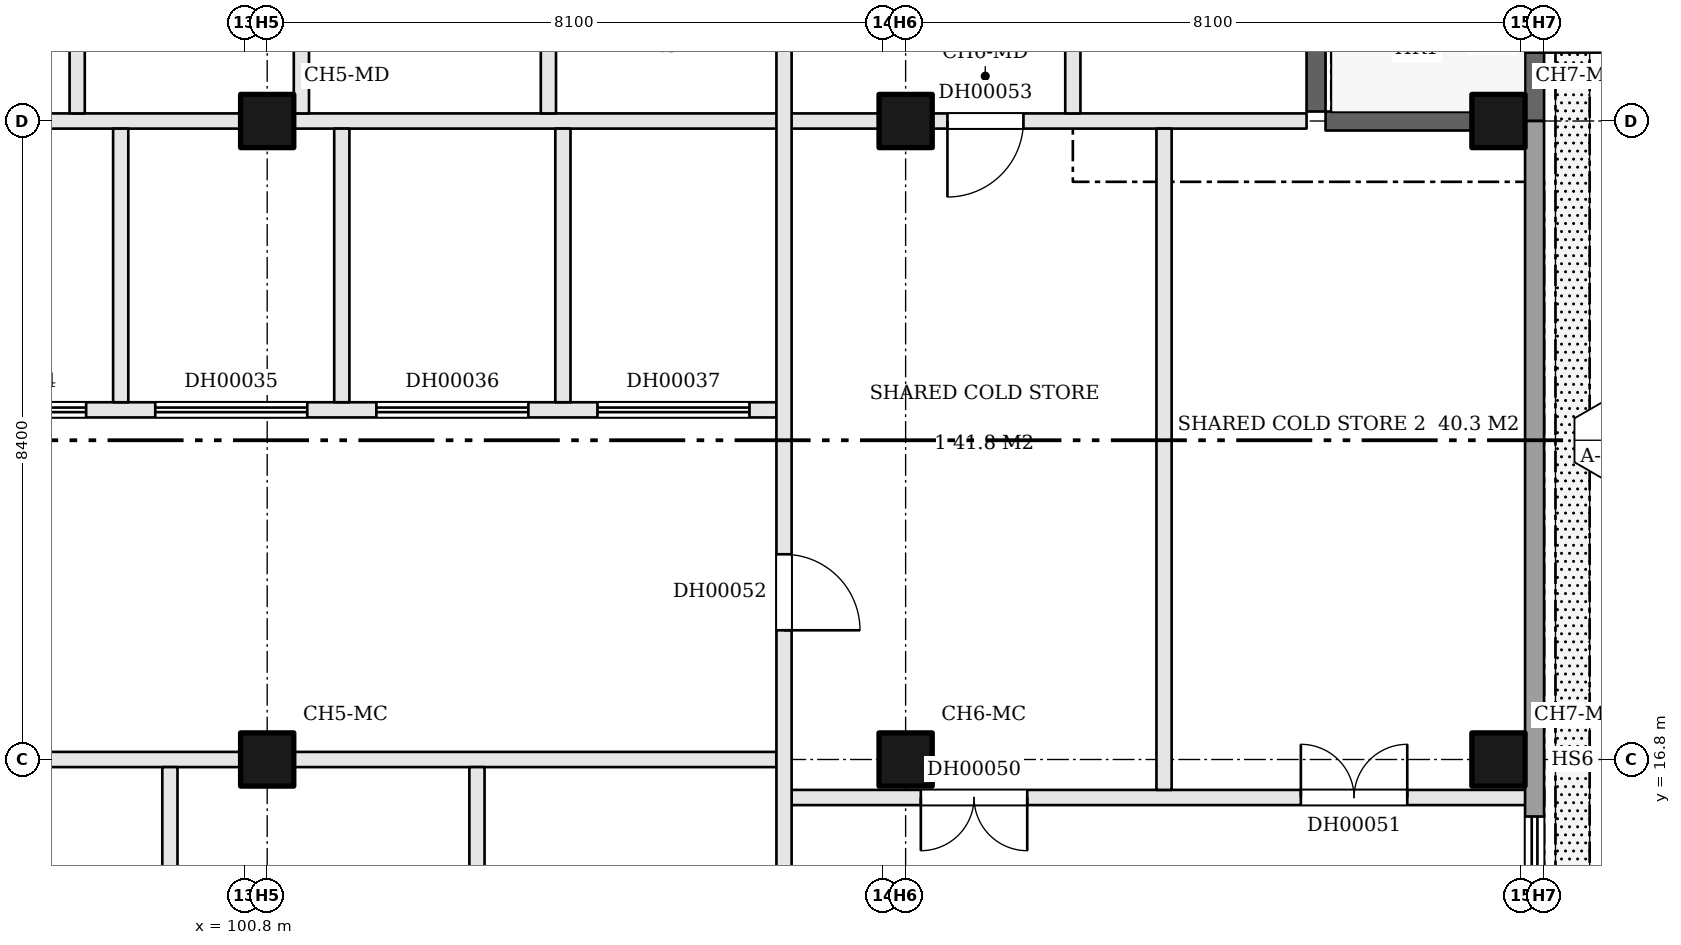
"""IFC4 building model, lengths in metres.
Left out: names, types, materials, properties, quantities, classifications, styles, units other than length and angle.
Written with IfcOpenShell. Run it as: python <this file> out.ifc"""

import sys

from ifc_helpers import new_model, si_unit, direction, frame, frame_2d, origin, origin_2d, place, context, subcontext, project, spatial, rectangle, extrude, element, fill, save


model = new_model("IFC4")
c1 = context("Model", 3, precision=1e-05, world=origin(), true_north=direction((0.0, 1.0)))
c2 = subcontext(c1, "Body", "Model", "MODEL_VIEW")
j1 = project(units=[si_unit("LENGTHUNIT", "METRE"), si_unit("PLANEANGLEUNIT", "RADIAN")], contexts=[c1])
p1 = place(None, origin())
s1 = spatial("IfcSite", under=j1, at=p1, CompositionType="ELEMENT")
p2 = place(p1, origin())
s2 = spatial("IfcBuilding", under=s1, at=p2, CompositionType="ELEMENT")
p3 = place(p2, origin())
s3 = spatial("IfcBuildingStorey", under=s2, at=p3, CompositionType="ELEMENT", Elevation=0.0)
for number, where, z_axis, x_axis in (
    (1, (101.1, 16.8, -0.2), (0.0, 0.0, 1.0), (1.0, 0.0, 0.0)),
    (2, (101.1, 25.2, -0.2), (0.0, 0.0, 1.0), (1.0, 0.0, 0.0)),
    (3, (109.5, 16.8, -0.2), (0.0, 0.0, 1.0), (1.0, 0.0, 0.0)),
    (4, (109.5, 25.2, -0.2), (0.0, 0.0, 1.0), (1.0, 0.0, 0.0)),
    (5, (117.3, 16.8, -0.2), (0.0, 0.0, 1.0), (1.0, 0.0, 0.0)),
):
    element("IfcColumn", number, at=place(p3, frame(where, z_axis=z_axis, x_axis=x_axis)), inside=s3, PredefinedType="COLUMN", context=c2, shape_type="SweptSolid", body=[
        extrude(rectangle(XDim=0.7, YDim=0.7, at=origin_2d()), origin(), (0.0, 0.0, 1.0), 8.9),
    ])
p4 = place(p3, frame((117.3, 25.2, 0.0), z_axis=(0.0, 0.0, 1.0), x_axis=(1.0, 0.0, 0.0)))
e6 = element("IfcColumn", 6, at=p4, inside=s3, PredefinedType="COLUMN", context=c2, shape_type="SweptSolid", body=[
    extrude(rectangle(XDim=0.7, YDim=0.7, at=origin_2d()), origin(), (0.0, 0.0, 1.0), 8.7),
])
p5 = place(p3, frame((108.0, 16.3, 0.0), z_axis=(0.0, 0.0, 1.0), x_axis=(1.0, 0.0, 0.0)))
e7 = element("IfcWall", 7, at=p5, inside=s3, PredefinedType="PARTITIONING", context=c2, shape_type="SweptSolid", body=[
    extrude(rectangle(XDim=9.9, YDim=0.2, at=frame_2d((4.95, 0.0))), origin(), (0.0, 0.0, 1.0), 8.7),
])
p6 = place(p5, frame((1.7, 0.0, 0.0)))
e8 = element("IfcOpeningElement", 8, at=p6, cuts=e7, PredefinedType="OPENING", context=c2, shape_type="SweptSolid", body=[
    extrude(rectangle(XDim=1.4, YDim=2.1, at=frame_2d((0.7, 1.05))), frame((0.0, 0.11, 0.0), z_axis=(0.0, -1.0, 0.0), x_axis=(1.0, 0.0, 0.0)), (0.0, 0.0, 1.0), 0.22),
])
p7 = place(p5, frame((6.7, 0.0, 0.0)))
e9 = element("IfcOpeningElement", 9, at=p7, cuts=e7, PredefinedType="OPENING", context=c2, shape_type="SweptSolid", body=[
    extrude(rectangle(XDim=1.4, YDim=2.1, at=frame_2d((0.7, 1.05))), frame((0.0, 0.11, 0.0), z_axis=(0.0, -1.0, 0.0), x_axis=(1.0, 0.0, 0.0)), (0.0, 0.0, 1.0), 0.22),
])
p8 = place(p3, frame((93.05, 16.8, 0.0), z_axis=(0.0, 0.0, 1.0), x_axis=(1.0, 0.0, 0.0)))
e10 = element("IfcWall", 10, at=p8, inside=s3, PredefinedType="PARTITIONING", context=c2, shape_type="SweptSolid", body=[
    extrude(rectangle(XDim=7.7, YDim=0.2, at=frame_2d((3.85, 0.0))), origin(), (0.0, 0.0, 1.0), 8.7),
])
p9 = place(p3, frame((101.45, 16.8, 0.0), z_axis=(0.0, 0.0, 1.0), x_axis=(1.0, 0.0, 0.0)))
e11 = element("IfcWall", 11, at=p9, inside=s3, PredefinedType="PARTITIONING", context=c2, shape_type="SweptSolid", body=[
    extrude(rectangle(XDim=6.35, YDim=0.2, at=frame_2d((3.175, 0.0))), origin(), (0.0, 0.0, 1.0), 8.7),
])
p10 = place(p3, frame((76.0, 21.4, 0.0), z_axis=(0.0, 0.0, 1.0), x_axis=(1.0, 0.0, 0.0)))
e12 = element("IfcWall", 12, at=p10, inside=s3, PredefinedType="PARTITIONING", context=c2, shape_type="SweptSolid", body=[
    extrude(rectangle(XDim=31.8, YDim=0.2, at=frame_2d((15.9, 0.0))), origin(), (0.0, 0.0, 1.0), 8.7),
])
p11 = place(p10, frame((0.354, 0.0, 0.0)))
e13 = element("IfcOpeningElement", 13, at=p11, cuts=e12, PredefinedType="OPENING", context=c2, shape_type="SweptSolid", body=[
    extrude(rectangle(XDim=2.0, YDim=2.4, at=frame_2d((1.0, 1.2))), frame((0.0, 0.11, 0.0), z_axis=(0.0, -1.0, 0.0), x_axis=(1.0, 0.0, 0.0)), (0.0, 0.0, 1.0), 0.22),
])
p12 = place(p10, frame((3.264, 0.0, 0.0)))
e14 = element("IfcOpeningElement", 14, at=p12, cuts=e12, PredefinedType="OPENING", context=c2, shape_type="SweptSolid", body=[
    extrude(rectangle(XDim=2.0, YDim=2.4, at=frame_2d((1.0, 1.2))), frame((0.0, 0.11, 0.0), z_axis=(0.0, -1.0, 0.0), x_axis=(1.0, 0.0, 0.0)), (0.0, 0.0, 1.0), 0.22),
])
p13 = place(p10, frame((6.173, 0.0, 0.0)))
e15 = element("IfcOpeningElement", 15, at=p13, cuts=e12, PredefinedType="OPENING", context=c2, shape_type="SweptSolid", body=[
    extrude(rectangle(XDim=2.0, YDim=2.4, at=frame_2d((1.0, 1.2))), frame((0.0, 0.11, 0.0), z_axis=(0.0, -1.0, 0.0), x_axis=(1.0, 0.0, 0.0)), (0.0, 0.0, 1.0), 0.22),
])
p14 = place(p10, frame((9.082, 0.0, 0.0)))
e16 = element("IfcOpeningElement", 16, at=p14, cuts=e12, PredefinedType="OPENING", context=c2, shape_type="SweptSolid", body=[
    extrude(rectangle(XDim=2.0, YDim=2.4, at=frame_2d((1.0, 1.2))), frame((0.0, 0.11, 0.0), z_axis=(0.0, -1.0, 0.0), x_axis=(1.0, 0.0, 0.0)), (0.0, 0.0, 1.0), 0.22),
])
p15 = place(p10, frame((11.991, 0.0, 0.0)))
e17 = element("IfcOpeningElement", 17, at=p15, cuts=e12, PredefinedType="OPENING", context=c2, shape_type="SweptSolid", body=[
    extrude(rectangle(XDim=2.0, YDim=2.4, at=frame_2d((1.0, 1.2))), frame((0.0, 0.11, 0.0), z_axis=(0.0, -1.0, 0.0), x_axis=(1.0, 0.0, 0.0)), (0.0, 0.0, 1.0), 0.22),
])
p16 = place(p10, frame((14.9, 0.0, 0.0)))
e18 = element("IfcOpeningElement", 18, at=p16, cuts=e12, PredefinedType="OPENING", context=c2, shape_type="SweptSolid", body=[
    extrude(rectangle(XDim=2.0, YDim=2.4, at=frame_2d((1.0, 1.2))), frame((0.0, 0.11, 0.0), z_axis=(0.0, -1.0, 0.0), x_axis=(1.0, 0.0, 0.0)), (0.0, 0.0, 1.0), 0.22),
])
p17 = place(p10, frame((17.809, 0.0, 0.0)))
e19 = element("IfcOpeningElement", 19, at=p17, cuts=e12, PredefinedType="OPENING", context=c2, shape_type="SweptSolid", body=[
    extrude(rectangle(XDim=2.0, YDim=2.4, at=frame_2d((1.0, 1.2))), frame((0.0, 0.11, 0.0), z_axis=(0.0, -1.0, 0.0), x_axis=(1.0, 0.0, 0.0)), (0.0, 0.0, 1.0), 0.22),
])
p18 = place(p10, frame((20.718, 0.0, 0.0)))
e20 = element("IfcOpeningElement", 20, at=p18, cuts=e12, PredefinedType="OPENING", context=c2, shape_type="SweptSolid", body=[
    extrude(rectangle(XDim=2.0, YDim=2.4, at=frame_2d((1.0, 1.2))), frame((0.0, 0.11, 0.0), z_axis=(0.0, -1.0, 0.0), x_axis=(1.0, 0.0, 0.0)), (0.0, 0.0, 1.0), 0.22),
])
p19 = place(p10, frame((23.627, 0.0, 0.0)))
e21 = element("IfcOpeningElement", 21, at=p19, cuts=e12, PredefinedType="OPENING", context=c2, shape_type="SweptSolid", body=[
    extrude(rectangle(XDim=2.0, YDim=2.4, at=frame_2d((1.0, 1.2))), frame((0.0, 0.11, 0.0), z_axis=(0.0, -1.0, 0.0), x_axis=(1.0, 0.0, 0.0)), (0.0, 0.0, 1.0), 0.22),
])
p20 = place(p10, frame((26.536, 0.0, 0.0)))
e22 = element("IfcOpeningElement", 22, at=p20, cuts=e12, PredefinedType="OPENING", context=c2, shape_type="SweptSolid", body=[
    extrude(rectangle(XDim=2.0, YDim=2.4, at=frame_2d((1.0, 1.2))), frame((0.0, 0.11, 0.0), z_axis=(0.0, -1.0, 0.0), x_axis=(1.0, 0.0, 0.0)), (0.0, 0.0, 1.0), 0.22),
])
p21 = place(p10, frame((29.446, 0.0, 0.0)))
e23 = element("IfcOpeningElement", 23, at=p21, cuts=e12, PredefinedType="OPENING", context=c2, shape_type="SweptSolid", body=[
    extrude(rectangle(XDim=2.0, YDim=2.4, at=frame_2d((1.0, 1.2))), frame((0.0, 0.11, 0.0), z_axis=(0.0, -1.0, 0.0), x_axis=(1.0, 0.0, 0.0)), (0.0, 0.0, 1.0), 0.22),
])
for number, where, z_axis, x_axis in (
    (24, (93.05, 25.2, 0.0), (0.0, 0.0, 1.0), (1.0, 0.0, 0.0)),
    (25, (101.45, 25.2, 0.0), (0.0, 0.0, 1.0), (1.0, 0.0, 0.0)),
):
    element("IfcWall", number, at=place(p3, frame(where, z_axis=z_axis, x_axis=x_axis)), inside=s3, PredefinedType="PARTITIONING", context=c2, shape_type="SweptSolid", body=[
        extrude(rectangle(XDim=7.7, YDim=0.2, at=frame_2d((3.85, 0.0))), origin(), (0.0, 0.0, 1.0), 8.7),
    ])
p22 = place(p3, frame((109.85, 25.2, 0.0), z_axis=(0.0, 0.0, 1.0), x_axis=(1.0, 0.0, 0.0)))
e26 = element("IfcWall", 26, at=p22, inside=s3, PredefinedType="PARTITIONING", context=c2, shape_type="SweptSolid", body=[
    extrude(rectangle(XDim=4.925, YDim=0.2, at=frame_2d((2.462, 0.0))), origin(), (0.0, 0.0, 1.0), 8.7),
])
p23 = place(p22, frame((0.2, 0.0, 0.0)))
e27 = element("IfcOpeningElement", 27, at=p23, cuts=e26, PredefinedType="OPENING", context=c2, shape_type="SweptSolid", body=[
    extrude(rectangle(XDim=1.0, YDim=2.1, at=frame_2d((0.5, 1.05))), frame((0.0, 0.11, 0.0), z_axis=(0.0, -1.0, 0.0), x_axis=(1.0, 0.0, 0.0)), (0.0, 0.0, 1.0), 0.22),
])
p24 = place(p3, frame((115.025, 25.2, 0.0), z_axis=(0.0, 0.0, 1.0), x_axis=(1.0, 0.0, 0.0)))
e28 = element("IfcWall", 28, at=p24, inside=s3, PredefinedType="SHEAR", context=c2, shape_type="SweptSolid", body=[
    extrude(rectangle(XDim=1.925, YDim=0.25, at=frame_2d((0.962, 0.0))), origin(), (0.0, 0.0, 1.0), 8.7),
])
p25 = place(p3, frame((98.6, 25.3, 0.0), z_axis=(0.0, 0.0, 1.0), x_axis=(0.0, 1.0, 0.0)))
e29 = element("IfcWall", 29, at=p25, inside=s3, PredefinedType="PARTITIONING", context=c2, shape_type="SweptSolid", body=[
    extrude(rectangle(XDim=4.4, YDim=0.2, at=frame_2d((2.2, 0.0))), origin(), (0.0, 0.0, 1.0), 8.7),
])
p26 = place(p3, frame((99.173, 21.5, 0.0), z_axis=(0.0, 0.0, 1.0), x_axis=(0.0, 1.0, 0.0)))
e30 = element("IfcWall", 30, at=p26, inside=s3, PredefinedType="PARTITIONING", context=c2, shape_type="SweptSolid", body=[
    extrude(rectangle(XDim=3.6, YDim=0.2, at=frame_2d((1.8, 0.0))), origin(), (0.0, 0.0, 1.0), 8.7),
])
p27 = place(p3, frame((99.82, 14.4, 0.0), z_axis=(0.0, 0.0, 1.0), x_axis=(0.0, 1.0, 0.0)))
e31 = element("IfcWall", 31, at=p27, inside=s3, PredefinedType="PARTITIONING", context=c2, shape_type="SweptSolid", body=[
    extrude(rectangle(XDim=2.3, YDim=0.2, at=frame_2d((1.15, 0.0))), origin(), (0.0, 0.0, 1.0), 8.7),
])
p28 = place(p3, frame((101.55, 25.3, 0.0), z_axis=(0.0, 0.0, 1.0), x_axis=(0.0, 1.0, 0.0)))
e32 = element("IfcWall", 32, at=p28, inside=s3, PredefinedType="PARTITIONING", context=c2, shape_type="SweptSolid", body=[
    extrude(rectangle(XDim=4.4, YDim=0.2, at=frame_2d((2.2, 0.0))), origin(), (0.0, 0.0, 1.0), 8.7),
])
p29 = place(p3, frame((102.082, 21.5, 0.0), z_axis=(0.0, 0.0, 1.0), x_axis=(0.0, 1.0, 0.0)))
e33 = element("IfcWall", 33, at=p29, inside=s3, PredefinedType="PARTITIONING", context=c2, shape_type="SweptSolid", body=[
    extrude(rectangle(XDim=3.6, YDim=0.2, at=frame_2d((1.8, 0.0))), origin(), (0.0, 0.0, 1.0), 8.7),
])
p30 = place(p3, frame((103.86, 14.4, 0.0), z_axis=(0.0, 0.0, 1.0), x_axis=(0.0, 1.0, 0.0)))
e34 = element("IfcWall", 34, at=p30, inside=s3, PredefinedType="PARTITIONING", context=c2, shape_type="SweptSolid", body=[
    extrude(rectangle(XDim=2.3, YDim=0.2, at=frame_2d((1.15, 0.0))), origin(), (0.0, 0.0, 1.0), 8.7),
])
p31 = place(p3, frame((104.8, 25.3, 0.0), z_axis=(0.0, 0.0, 1.0), x_axis=(0.0, 1.0, 0.0)))
e35 = element("IfcWall", 35, at=p31, inside=s3, PredefinedType="PARTITIONING", context=c2, shape_type="SweptSolid", body=[
    extrude(rectangle(XDim=4.4, YDim=0.2, at=frame_2d((2.2, 0.0))), origin(), (0.0, 0.0, 1.0), 8.7),
])
p32 = place(p3, frame((104.991, 21.5, 0.0), z_axis=(0.0, 0.0, 1.0), x_axis=(0.0, 1.0, 0.0)))
e36 = element("IfcWall", 36, at=p32, inside=s3, PredefinedType="PARTITIONING", context=c2, shape_type="SweptSolid", body=[
    extrude(rectangle(XDim=3.6, YDim=0.2, at=frame_2d((1.8, 0.0))), origin(), (0.0, 0.0, 1.0), 8.7),
])
p33 = place(p3, frame((107.9, 8.5, 0.0), z_axis=(0.0, 0.0, 1.0), x_axis=(0.0, 1.0, 0.0)))
e37 = element("IfcWall", 37, at=p33, inside=s3, PredefinedType="PARTITIONING", context=c2, shape_type="SweptSolid", body=[
    extrude(rectangle(XDim=25.1, YDim=0.2, at=frame_2d((12.55, 0.0))), origin(), (0.0, 0.0, 1.0), 8.7),
])
p34 = place(p33, frame((3.8, 0.0, 0.0)))
e38 = element("IfcOpeningElement", 38, at=p34, cuts=e37, PredefinedType="OPENING", context=c2, shape_type="SweptSolid", body=[
    extrude(rectangle(XDim=1.0, YDim=2.1, at=frame_2d((0.5, 1.05))), frame((0.0, 0.11, 0.0), z_axis=(0.0, -1.0, 0.0), x_axis=(1.0, 0.0, 0.0)), (0.0, 0.0, 1.0), 0.22),
])
p35 = place(p33, frame((10.0, 0.0, 0.0)))
e39 = element("IfcOpeningElement", 39, at=p35, cuts=e37, PredefinedType="OPENING", context=c2, shape_type="SweptSolid", body=[
    extrude(rectangle(XDim=1.0, YDim=2.1, at=frame_2d((0.5, 1.05))), frame((0.0, 0.11, 0.0), z_axis=(0.0, -1.0, 0.0), x_axis=(1.0, 0.0, 0.0)), (0.0, 0.0, 1.0), 0.22),
])
p36 = place(p33, frame((22.5, 0.0, 0.0)))
e40 = element("IfcOpeningElement", 40, at=p36, cuts=e37, PredefinedType="OPENING", context=c2, shape_type="SweptSolid", body=[
    extrude(rectangle(XDim=1.0, YDim=2.1, at=frame_2d((0.5, 1.05))), frame((0.0, 0.11, 0.0), z_axis=(0.0, -1.0, 0.0), x_axis=(1.0, 0.0, 0.0)), (0.0, 0.0, 1.0), 0.22),
])
p37 = place(p3, frame((111.7, 25.3, 0.0), z_axis=(0.0, 0.0, 1.0), x_axis=(0.0, 1.0, 0.0)))
e41 = element("IfcWall", 41, at=p37, inside=s3, PredefinedType="PARTITIONING", context=c2, shape_type="SweptSolid", body=[
    extrude(rectangle(XDim=8.3, YDim=0.2, at=frame_2d((4.15, 0.0))), origin(), (0.0, 0.0, 1.0), 8.7),
])
p38 = place(p37, frame((3.6, 0.0, 0.0)))
e42 = element("IfcOpeningElement", 42, at=p38, cuts=e41, PredefinedType="OPENING", context=c2, shape_type="SweptSolid", body=[
    extrude(rectangle(XDim=1.0, YDim=2.1, at=frame_2d((0.5, 1.05))), frame((0.0, 0.11, 0.0), z_axis=(0.0, -1.0, 0.0), x_axis=(1.0, 0.0, 0.0)), (0.0, 0.0, 1.0), 0.22),
])
p39 = place(p3, frame((112.9, 16.4, 0.0), z_axis=(0.0, 0.0, 1.0), x_axis=(0.0, 1.0, 0.0)))
e43 = element("IfcWall", 43, at=p39, inside=s3, PredefinedType="PARTITIONING", context=c2, shape_type="SweptSolid", body=[
    extrude(rectangle(XDim=8.7, YDim=0.2, at=frame_2d((4.35, 0.0))), origin(), (0.0, 0.0, 1.0), 8.7),
])
p40 = place(p3, frame((114.9, 25.325, 0.0), z_axis=(0.0, 0.0, 1.0), x_axis=(0.0, 1.0, 0.0)))
e44 = element("IfcWall", 44, at=p40, inside=s3, PredefinedType="SHEAR", context=c2, shape_type="SweptSolid", body=[
    extrude(rectangle(XDim=8.275, YDim=0.25, at=frame_2d((4.138, 0.0))), origin(), (0.0, 0.0, 1.0), 8.7),
])
p41 = place(p3, frame((117.775, 8.4, 0.0), z_axis=(0.0, 0.0, 1.0), x_axis=(0.0, 1.0, 0.0)))
e45 = element("IfcWall", 45, at=p41, inside=s3, PredefinedType="SOLIDWALL", context=c2, shape_type="SweptSolid", body=[
    extrude(rectangle(XDim=16.8, YDim=0.25, at=frame_2d((8.4, 0.0))), origin(), (0.0, 0.0, 1.0), 8.7),
])
p42 = place(p41, frame((1.15, 0.0, 0.0)))
e46 = element("IfcOpeningElement", 46, at=p42, cuts=e45, PredefinedType="OPENING", context=c2, shape_type="SweptSolid", body=[
    extrude(rectangle(XDim=3.0, YDim=4.5, at=frame_2d((1.5, 2.25))), frame((0.0, 0.135, 0.0), z_axis=(0.0, -1.0, 0.0), x_axis=(1.0, 0.0, 0.0)), (0.0, 0.0, 1.0), 0.27),
])
p43 = place(p41, frame((4.65, 0.0, 0.0)))
e47 = element("IfcOpeningElement", 47, at=p43, cuts=e45, PredefinedType="OPENING", context=c2, shape_type="SweptSolid", body=[
    extrude(rectangle(XDim=3.0, YDim=4.5, at=frame_2d((1.5, 2.25))), frame((0.0, 0.135, 0.0), z_axis=(0.0, -1.0, 0.0), x_axis=(1.0, 0.0, 0.0)), (0.0, 0.0, 1.0), 0.27),
])
p44 = place(p3, frame((117.775, 25.2, 0.0), z_axis=(0.0, 0.0, 1.0), x_axis=(0.0, 1.0, 0.0)))
e48 = element("IfcWall", 48, at=p44, inside=s3, PredefinedType="SHEAR", context=c2, shape_type="SweptSolid", body=[
    extrude(rectangle(XDim=8.4, YDim=0.25, at=frame_2d((4.2, 0.0))), origin(), (0.0, 0.0, 1.0), 8.7),
])
p45 = place(p44, frame((0.9, 0.0, 0.0)))
e49 = element("IfcOpeningElement", 49, at=p45, cuts=e48, PredefinedType="OPENING", context=c2, shape_type="SweptSolid", body=[
    extrude(rectangle(XDim=1.2, YDim=2.1, at=frame_2d((0.6, 1.05))), frame((0.0, 0.135, 0.0), z_axis=(0.0, -1.0, 0.0), x_axis=(1.0, 0.0, 0.0)), (0.0, 0.0, 1.0), 0.27),
])
p46 = place(p18, origin())
e50 = element("IfcDoor", 50, at=p46, inside=s3, OperationType="ROLLINGUP", PredefinedType="DOOR", context=c2, shape_type="SweptSolid", body=[
    extrude(rectangle(XDim=2.0, YDim=2.4, at=frame_2d((1.0, 1.2))), frame((0.0, 0.025, 0.0), z_axis=(0.0, -1.0, 0.0), x_axis=(1.0, 0.0, 0.0)), (0.0, 0.0, 1.0), 0.05),
])
fill(e20, e50)
p47 = place(p19, origin())
e51 = element("IfcDoor", 51, at=p47, inside=s3, OperationType="ROLLINGUP", PredefinedType="DOOR", context=c2, shape_type="SweptSolid", body=[
    extrude(rectangle(XDim=2.0, YDim=2.4, at=frame_2d((1.0, 1.2))), frame((0.0, 0.025, 0.0), z_axis=(0.0, -1.0, 0.0), x_axis=(1.0, 0.0, 0.0)), (0.0, 0.0, 1.0), 0.05),
])
fill(e21, e51)
p48 = place(p20, origin())
e52 = element("IfcDoor", 52, at=p48, inside=s3, OperationType="ROLLINGUP", PredefinedType="DOOR", context=c2, shape_type="SweptSolid", body=[
    extrude(rectangle(XDim=2.0, YDim=2.4, at=frame_2d((1.0, 1.2))), frame((0.0, 0.025, 0.0), z_axis=(0.0, -1.0, 0.0), x_axis=(1.0, 0.0, 0.0)), (0.0, 0.0, 1.0), 0.05),
])
fill(e22, e52)
p49 = place(p21, origin())
e53 = element("IfcDoor", 53, at=p49, inside=s3, OperationType="ROLLINGUP", PredefinedType="DOOR", context=c2, shape_type="SweptSolid", body=[
    extrude(rectangle(XDim=2.0, YDim=2.4, at=frame_2d((1.0, 1.2))), frame((0.0, 0.025, 0.0), z_axis=(0.0, -1.0, 0.0), x_axis=(1.0, 0.0, 0.0)), (0.0, 0.0, 1.0), 0.05),
])
fill(e23, e53)
p50 = place(p6, frame((1.4, 0.0, 0.0), z_axis=(0.0, 0.0, 1.0), x_axis=(-1.0, 0.0, 0.0)))
e54 = element("IfcDoor", 54, at=p50, inside=s3, OperationType="DOUBLE_DOOR_SINGLE_SWING", PredefinedType="DOOR", context=c2, shape_type="SweptSolid", body=[
    extrude(rectangle(XDim=1.4, YDim=2.1, at=frame_2d((0.7, 1.05))), frame((0.0, 0.025, 0.0), z_axis=(0.0, -1.0, 0.0), x_axis=(1.0, 0.0, 0.0)), (0.0, 0.0, 1.0), 0.05),
])
fill(e8, e54)
p51 = place(p7, origin())
e55 = element("IfcDoor", 55, at=p51, inside=s3, OperationType="DOUBLE_DOOR_SINGLE_SWING", PredefinedType="DOOR", context=c2, shape_type="SweptSolid", body=[
    extrude(rectangle(XDim=1.4, YDim=2.1, at=frame_2d((0.7, 1.05))), frame((0.0, 0.025, 0.0), z_axis=(0.0, -1.0, 0.0), x_axis=(1.0, 0.0, 0.0)), (0.0, 0.0, 1.0), 0.05),
])
fill(e9, e55)
p52 = place(p35, frame((1.0, 0.0, 0.0), z_axis=(0.0, 0.0, 1.0), x_axis=(-1.0, 0.0, 0.0)))
e56 = element("IfcDoor", 56, at=p52, inside=s3, OperationType="SINGLE_SWING_RIGHT", PredefinedType="DOOR", context=c2, shape_type="SweptSolid", body=[
    extrude(rectangle(XDim=1.0, YDim=2.1, at=frame_2d((0.5, 1.05))), frame((0.0, 0.025, 0.0), z_axis=(0.0, -1.0, 0.0), x_axis=(1.0, 0.0, 0.0)), (0.0, 0.0, 1.0), 0.05),
])
fill(e39, e56)
p53 = place(p23, frame((1.0, 0.0, 0.0), z_axis=(0.0, 0.0, 1.0), x_axis=(-1.0, 0.0, 0.0)))
e57 = element("IfcDoor", 57, at=p53, inside=s3, OperationType="SINGLE_SWING_RIGHT", PredefinedType="DOOR", context=c2, shape_type="SweptSolid", body=[
    extrude(rectangle(XDim=1.0, YDim=2.1, at=frame_2d((0.5, 1.05))), frame((0.0, 0.025, 0.0), z_axis=(0.0, -1.0, 0.0), x_axis=(1.0, 0.0, 0.0)), (0.0, 0.0, 1.0), 0.05),
])
fill(e27, e57)
p54 = place(p43, frame((3.0, 0.0, 0.0), z_axis=(0.0, 0.0, 1.0), x_axis=(-1.0, 0.0, 0.0)))
e58 = element("IfcDoor", 58, at=p54, inside=s3, OperationType="ROLLINGUP", PredefinedType="DOOR", context=c2, shape_type="SweptSolid", body=[
    extrude(rectangle(XDim=3.0, YDim=4.5, at=frame_2d((1.5, 2.25))), frame((0.0, 0.025, 0.0), z_axis=(0.0, -1.0, 0.0), x_axis=(1.0, 0.0, 0.0)), (0.0, 0.0, 1.0), 0.05),
])
fill(e47, e58)
p55 = place(p45, frame((1.2, 0.0, 0.0), z_axis=(0.0, 0.0, 1.0), x_axis=(-1.0, 0.0, 0.0)))
e59 = element("IfcDoor", 59, at=p55, inside=s3, OperationType="SINGLE_SWING_RIGHT", PredefinedType="DOOR", context=c2, shape_type="SweptSolid", body=[
    extrude(rectangle(XDim=1.2, YDim=2.1, at=frame_2d((0.6, 1.05))), frame((0.0, 0.025, 0.0), z_axis=(0.0, -1.0, 0.0), x_axis=(1.0, 0.0, 0.0)), (0.0, 0.0, 1.0), 0.05),
])
fill(e49, e59)
save(model, sys.argv[1])
